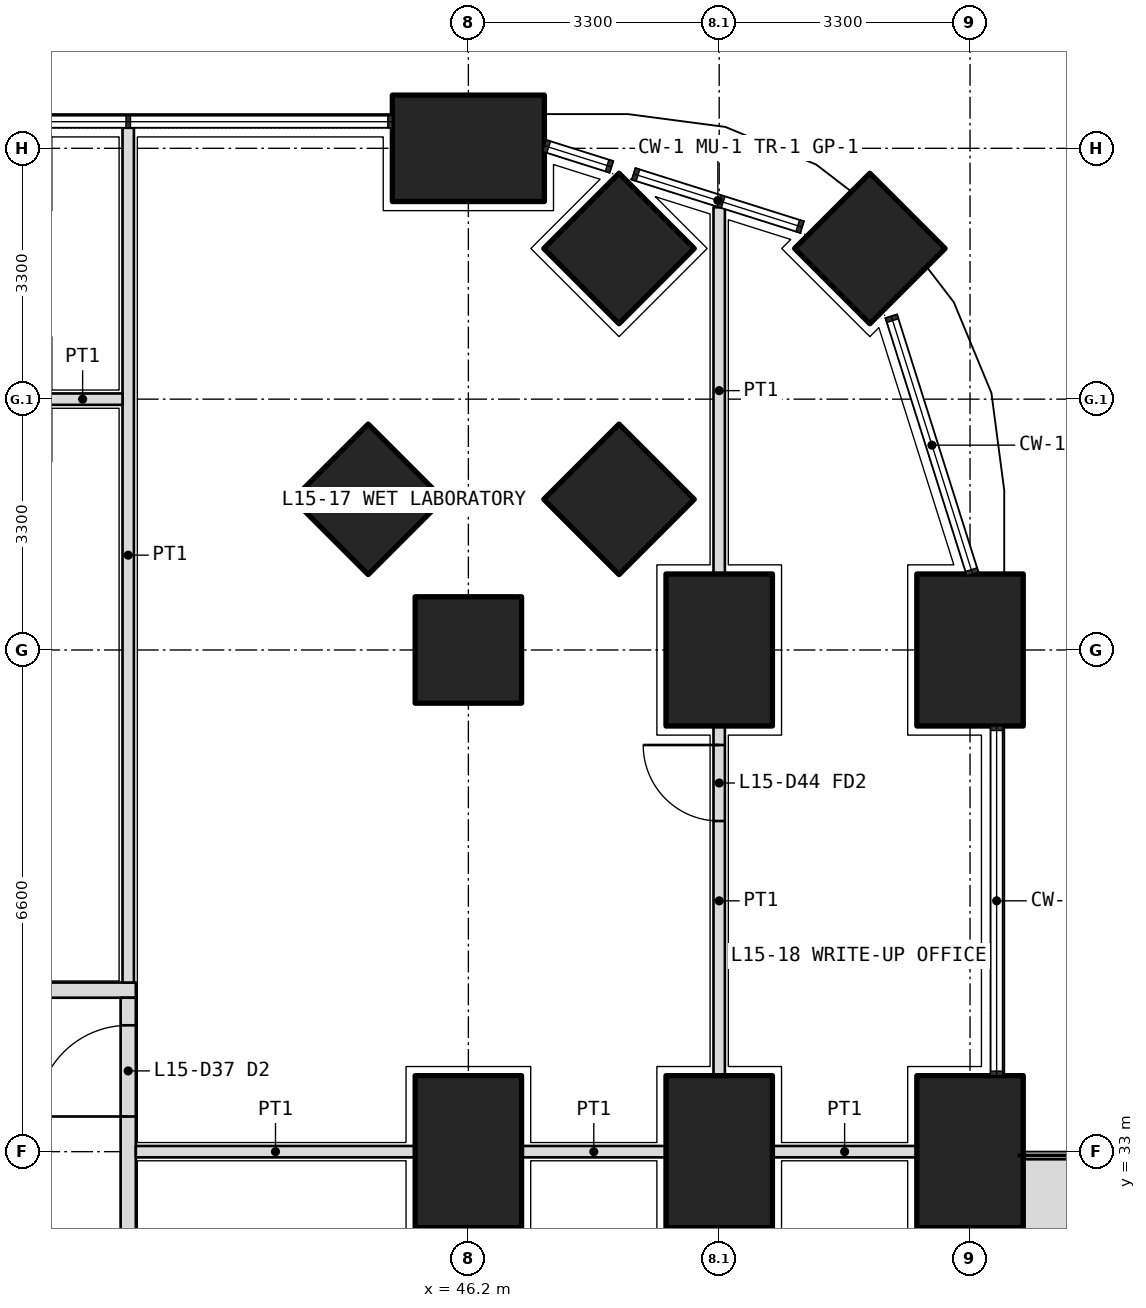
"""IFC4 building model, lengths in metres.
Left out: names, types, materials, properties, quantities, classifications, styles, units other than length and angle.
Written with IfcOpenShell. Run it as: python <this file> out.ifc"""

import sys

from ifc_helpers import new_model, si_unit, direction, frame, frame_2d, origin, origin_2d, place, context, subcontext, project, spatial, polyline, rectangle, outline, extrude, element, fill, save


model = new_model("IFC4")
c1 = context("Model", 3, precision=1e-05, world=origin(), true_north=direction((0.0, 1.0)))
c2 = subcontext(c1, "Body", "Model", "MODEL_VIEW")
j1 = project(units=[si_unit("LENGTHUNIT", "METRE"), si_unit("PLANEANGLEUNIT", "RADIAN")], contexts=[c1])
p1 = place(None, origin())
s1 = spatial("IfcSite", under=j1, at=p1, CompositionType="ELEMENT")
p2 = place(p1, origin())
s2 = spatial("IfcBuilding", under=s1, at=p2, CompositionType="ELEMENT")
p3 = place(p2, frame((0.0, 0.0, 67.5)))
s3 = spatial("IfcBuildingStorey", under=s2, at=p3, CompositionType="ELEMENT", Elevation=67.5)
p4 = place(p3, frame((51.482, 44.882, 0.0), z_axis=(0.0, 0.0, 1.0), x_axis=(0.707106781187, 0.707106781187, 0.0)))
e1 = element("IfcColumn", 1, at=p4, inside=s3, PredefinedType="COLUMN", context=c2, shape_type="SweptSolid", body=[
    extrude(rectangle(XDim=1.4, YDim=1.4, at=origin_2d()), origin(), (0.0, 0.0, 1.0), 4.2),
])
for number, where, z_axis, x_axis in (
    (2, (52.8, 33.0, 0.0), (0.0, 0.0, 1.0), (0.0, 1.0, 0.0)),
    (3, (52.8, 39.6, 0.0), (0.0, 0.0, 1.0), (0.0, 1.0, 0.0)),
    (4, (46.2, 46.2, 0.0), (0.0, 0.0, 1.0), (1.0, 0.0, 0.0)),
):
    element("IfcColumn", number, at=place(p3, frame(where, z_axis=z_axis, x_axis=x_axis)), inside=s3, PredefinedType="COLUMN", context=c2, shape_type="SweptSolid", body=[
        extrude(rectangle(XDim=2.0, YDim=1.4, at=origin_2d()), origin(), (0.0, 0.0, 1.0), 4.2),
    ])
for number, where, z_axis, x_axis in (
    (5, (46.2, 39.6, 0.0), (0.0, 0.0, 1.0), (1.0, 0.0, 0.0)),
    (6, (48.182, 44.882, 0.0), (0.0, 0.0, 1.0), (0.707, 0.707, 0.0)),
):
    element("IfcColumn", number, at=place(p3, frame(where, z_axis=z_axis, x_axis=x_axis)), inside=s3, PredefinedType="COLUMN", context=c2, shape_type="SweptSolid", body=[
        extrude(rectangle(XDim=1.4, YDim=1.4, at=origin_2d()), origin(), (0.0, 0.0, 1.0), 4.2),
    ])
for number, where, z_axis, x_axis in (
    (7, (49.5, 33.0, 0.0), (0.0, 0.0, 1.0), (0.0, 1.0, 0.0)),
    (8, (49.5, 39.6, 0.0), (0.0, 0.0, 1.0), (0.0, 1.0, 0.0)),
):
    element("IfcColumn", number, at=place(p3, frame(where, z_axis=z_axis, x_axis=x_axis)), inside=s3, PredefinedType="COLUMN", context=c2, shape_type="SweptSolid", body=[
        extrude(rectangle(XDim=2.0, YDim=1.4, at=origin_2d()), origin(), (0.0, 0.0, 1.0), 4.2),
    ])
for number, where, z_axis, x_axis in (
    (9, (48.182, 41.582, 0.0), (0.0, 0.0, 1.0), (0.707, 0.707, 0.0)),
    (10, (44.882, 41.582, 0.0), (0.0, 0.0, 1.0), (0.707, 0.707, 0.0)),
):
    element("IfcColumn", number, at=place(p3, frame(where, z_axis=z_axis, x_axis=x_axis)), inside=s3, PredefinedType="COLUMN", context=c2, shape_type="SweptSolid", body=[
        extrude(rectangle(XDim=1.4, YDim=1.4, at=origin_2d()), origin(), (0.0, 0.0, 1.0), 4.2),
    ])
p5 = place(p3, frame((46.2, 33.0, 0.0), z_axis=(0.0, 0.0, 1.0), x_axis=(0.0, 1.0, 0.0)))
e11 = element("IfcColumn", 11, at=p5, inside=s3, PredefinedType="COLUMN", context=c2, shape_type="SweptSolid", body=[
    extrude(rectangle(XDim=2.0, YDim=1.4, at=origin_2d()), origin(), (0.0, 0.0, 1.0), 4.2),
])
p6 = place(p3, origin())
e12 = element("IfcWall", 12, at=p6, inside=s3, PredefinedType="USERDEFINED", context=c2, shape_type="SweptSolid", body=[
    extrude(outline(polyline([(53.35, 23.85), (54.35, 23.85), (54.35, 32.9), (53.35, 32.9), (53.35, 23.85)]), holes=[polyline([(53.5, 24.0), (54.2, 24.0), (54.2, 32.75), (53.5, 32.75), (53.5, 24.0)])]), origin(), (0.0, 0.0, 1.0), 1.05),
])
p7 = place(p3, frame((23.1, 35.125, 0.0), z_axis=(0.0, 0.0, 1.0), x_axis=(1.0, 0.0, 0.0)))
e13 = element("IfcWall", 13, at=p7, inside=s3, PredefinedType="PARTITIONING", context=c2, shape_type="SweptSolid", body=[
    extrude(rectangle(XDim=18.725, YDim=0.2, at=frame_2d((9.362, 0.0))), origin(), (0.0, 0.0, 1.0), 2.85),
])
p8 = place(p7, frame((2.7, 0.0, 0.0)))
e14 = element("IfcOpeningElement", 14, at=p8, cuts=e13, PredefinedType="OPENING", context=c2, shape_type="SweptSolid", body=[
    extrude(rectangle(XDim=1.2, YDim=2.1, at=frame_2d((0.6, 1.05))), frame((0.0, 0.11, 0.0), z_axis=(0.0, -1.0, 0.0), x_axis=(1.0, 0.0, 0.0)), (0.0, 0.0, 1.0), 0.22),
])
p9 = place(p7, frame((8.2, 0.0, 0.0)))
e15 = element("IfcOpeningElement", 15, at=p9, cuts=e13, PredefinedType="OPENING", context=c2, shape_type="SweptSolid", body=[
    extrude(rectangle(XDim=1.0, YDim=2.1, at=frame_2d((0.5, 1.05))), frame((0.0, 0.11, 0.0), z_axis=(0.0, -1.0, 0.0), x_axis=(1.0, 0.0, 0.0)), (0.0, 0.0, 1.0), 0.22),
])
p10 = place(p7, frame((11.5, 0.0, 0.0)))
e16 = element("IfcOpeningElement", 16, at=p10, cuts=e13, PredefinedType="OPENING", context=c2, shape_type="SweptSolid", body=[
    extrude(rectangle(XDim=1.0, YDim=2.1, at=frame_2d((0.5, 1.05))), frame((0.0, 0.11, 0.0), z_axis=(0.0, -1.0, 0.0), x_axis=(1.0, 0.0, 0.0)), (0.0, 0.0, 1.0), 0.22),
])
p11 = place(p7, frame((15.312, 0.0, 0.0)))
e17 = element("IfcOpeningElement", 17, at=p11, cuts=e13, PredefinedType="OPENING", context=c2, shape_type="SweptSolid", body=[
    extrude(rectangle(XDim=1.2, YDim=2.1, at=frame_2d((0.6, 1.05))), frame((0.0, 0.11, 0.0), z_axis=(0.0, -1.0, 0.0), x_axis=(1.0, 0.0, 0.0)), (0.0, 0.0, 1.0), 0.22),
])
p12 = place(p3, frame((41.725, 11.175, 0.0), z_axis=(0.0, 0.0, 1.0), x_axis=(0.0, 1.0, 0.0)))
e18 = element("IfcWall", 18, at=p12, inside=s3, PredefinedType="PARTITIONING", context=c2, shape_type="SweptSolid", body=[
    extrude(rectangle(XDim=23.85, YDim=0.2, at=frame_2d((11.925, 0.0))), origin(), (0.0, 0.0, 1.0), 2.85),
])
p13 = place(p12, frame((3.762, 0.0, 0.0)))
e19 = element("IfcOpeningElement", 19, at=p13, cuts=e18, PredefinedType="OPENING", context=c2, shape_type="SweptSolid", body=[
    extrude(rectangle(XDim=1.0, YDim=2.1, at=frame_2d((0.5, 1.05))), frame((0.0, 0.11, 0.0), z_axis=(0.0, -1.0, 0.0), x_axis=(1.0, 0.0, 0.0)), (0.0, 0.0, 1.0), 0.22),
])
p14 = place(p12, frame((9.725, 0.0, 0.0)))
e20 = element("IfcOpeningElement", 20, at=p14, cuts=e18, PredefinedType="OPENING", context=c2, shape_type="SweptSolid", body=[
    extrude(rectangle(XDim=1.0, YDim=2.1, at=frame_2d((0.5, 1.05))), frame((0.0, 0.11, 0.0), z_axis=(0.0, -1.0, 0.0), x_axis=(1.0, 0.0, 0.0)), (0.0, 0.0, 1.0), 0.22),
])
p15 = place(p12, frame((13.075, 0.0, 0.0)))
e21 = element("IfcOpeningElement", 21, at=p15, cuts=e18, PredefinedType="OPENING", context=c2, shape_type="SweptSolid", body=[
    extrude(rectangle(XDim=0.9, YDim=2.1, at=frame_2d((0.45, 1.05))), frame((0.0, 0.11, 0.0), z_axis=(0.0, -1.0, 0.0), x_axis=(1.0, 0.0, 0.0)), (0.0, 0.0, 1.0), 0.22),
])
p16 = place(p12, frame((16.275, 0.0, 0.0)))
e22 = element("IfcOpeningElement", 22, at=p16, cuts=e18, PredefinedType="OPENING", context=c2, shape_type="SweptSolid", body=[
    extrude(rectangle(XDim=1.2, YDim=2.1, at=frame_2d((0.6, 1.05))), frame((0.0, 0.11, 0.0), z_axis=(0.0, -1.0, 0.0), x_axis=(1.0, 0.0, 0.0)), (0.0, 0.0, 1.0), 0.22),
])
p17 = place(p12, frame((19.575, 0.0, 0.0)))
e23 = element("IfcOpeningElement", 23, at=p17, cuts=e18, PredefinedType="OPENING", context=c2, shape_type="SweptSolid", body=[
    extrude(rectangle(XDim=1.2, YDim=2.1, at=frame_2d((0.6, 1.05))), frame((0.0, 0.11, 0.0), z_axis=(0.0, -1.0, 0.0), x_axis=(1.0, 0.0, 0.0)), (0.0, 0.0, 1.0), 0.22),
])
p18 = place(p12, frame((22.288, 0.0, 0.0)))
e24 = element("IfcOpeningElement", 24, at=p18, cuts=e18, PredefinedType="OPENING", context=c2, shape_type="SweptSolid", body=[
    extrude(rectangle(XDim=1.2, YDim=2.1, at=frame_2d((0.6, 1.05))), frame((0.0, 0.11, 0.0), z_axis=(0.0, -1.0, 0.0), x_axis=(1.0, 0.0, 0.0)), (0.0, 0.0, 1.0), 0.22),
])
p19 = place(p3, frame((41.725, 46.47, 0.0), z_axis=(0.0, 0.0, 1.0), x_axis=(0.0, -1.0, 0.0)))
e25 = element("IfcWall", 25, at=p19, inside=s3, PredefinedType="PARTITIONING", context=c2, shape_type="SweptSolid", body=[
    extrude(rectangle(XDim=11.245, YDim=0.15, at=frame_2d((5.623, 0.0))), origin(), (0.0, 0.0, 1.0), 2.6),
])
p20 = place(p3, frame((49.5, 34.0, 0.0), z_axis=(0.0, 0.0, 1.0), x_axis=(0.0, 1.0, 0.0)))
e26 = element("IfcWall", 26, at=p20, inside=s3, PredefinedType="PARTITIONING", context=c2, shape_type="SweptSolid", body=[
    extrude(rectangle(XDim=4.6, YDim=0.15, at=frame_2d((2.3, 0.0))), origin(), (0.0, 0.0, 1.0), 3.9),
])
p21 = place(p20, frame((3.35, 0.0, 0.0)))
e27 = element("IfcOpeningElement", 27, at=p21, cuts=e26, PredefinedType="OPENING", context=c2, shape_type="SweptSolid", body=[
    extrude(rectangle(XDim=1.0, YDim=2.1, at=frame_2d((0.5, 1.05))), frame((0.0, 0.085, 0.0), z_axis=(0.0, -1.0, 0.0), x_axis=(1.0, 0.0, 0.0)), (0.0, 0.0, 1.0), 0.17),
])
p22 = place(p3, frame((49.5, 40.6, 0.0), z_axis=(0.0, 0.0, 1.0), x_axis=(0.0, 1.0, 0.0)))
e28 = element("IfcWall", 28, at=p22, inside=s3, PredefinedType="PARTITIONING", context=c2, shape_type="SweptSolid", body=[
    extrude(rectangle(XDim=4.824, YDim=0.15, at=frame_2d((2.412, 0.0))), origin(), (0.0, 0.0, 1.0), 2.6),
])
for number, where, z_axis, x_axis in (
    (29, (52.1, 33.0, 0.0), (0.0, 0.0, 1.0), (-1.0, 0.0, 0.0)),
    (30, (48.8, 33.0, 0.0), (0.0, 0.0, 1.0), (-1.0, 0.0, 0.0)),
):
    element("IfcWall", number, at=place(p3, frame(where, z_axis=z_axis, x_axis=x_axis)), inside=s3, PredefinedType="PARTITIONING", context=c2, shape_type="SweptSolid", body=[
        extrude(rectangle(XDim=1.9, YDim=0.15, at=frame_2d((0.95, 0.0))), origin(), (0.0, 0.0, 1.0), 2.85),
    ])
p23 = place(p3, frame((45.5, 33.0, 0.0), z_axis=(0.0, 0.0, 1.0), x_axis=(-1.0, 0.0, 0.0)))
e31 = element("IfcWall", 31, at=p23, inside=s3, PredefinedType="PARTITIONING", context=c2, shape_type="SweptSolid", body=[
    extrude(rectangle(XDim=3.675, YDim=0.15, at=frame_2d((1.837, 0.0))), origin(), (0.0, 0.0, 1.0), 2.85),
])
p24 = place(p3, frame((41.65, 42.9, 0.0), z_axis=(0.0, 0.0, 1.0), x_axis=(-1.0, 0.0, 0.0)))
e32 = element("IfcWall", 32, at=p24, inside=s3, PredefinedType="PARTITIONING", context=c2, shape_type="SweptSolid", body=[
    extrude(rectangle(XDim=1.05, YDim=0.15, at=frame_2d((0.525, 0.0))), origin(), (0.0, 0.0, 1.0), 3.9),
])
p25 = place(p18, origin())
e33 = element("IfcDoor", 33, at=p25, inside=s3, OperationType="DOUBLE_DOOR_SINGLE_SWING", PredefinedType="DOOR", context=c2, shape_type="SweptSolid", body=[
    extrude(rectangle(XDim=1.2, YDim=2.1, at=frame_2d((0.6, 1.05))), frame((0.0, 0.025, 0.0), z_axis=(0.0, -1.0, 0.0), x_axis=(1.0, 0.0, 0.0)), (0.0, 0.0, 1.0), 0.05),
])
fill(e24, e33)
p26 = place(p21, origin())
e34 = element("IfcDoor", 34, at=p26, inside=s3, OperationType="SINGLE_SWING_RIGHT", PredefinedType="DOOR", context=c2, shape_type="SweptSolid", body=[
    extrude(rectangle(XDim=1.0, YDim=2.1, at=frame_2d((0.5, 1.05))), frame((0.0, 0.025, 0.0), z_axis=(0.0, -1.0, 0.0), x_axis=(1.0, 0.0, 0.0)), (0.0, 0.0, 1.0), 0.05),
])
fill(e27, e34)
save(model, sys.argv[1])
